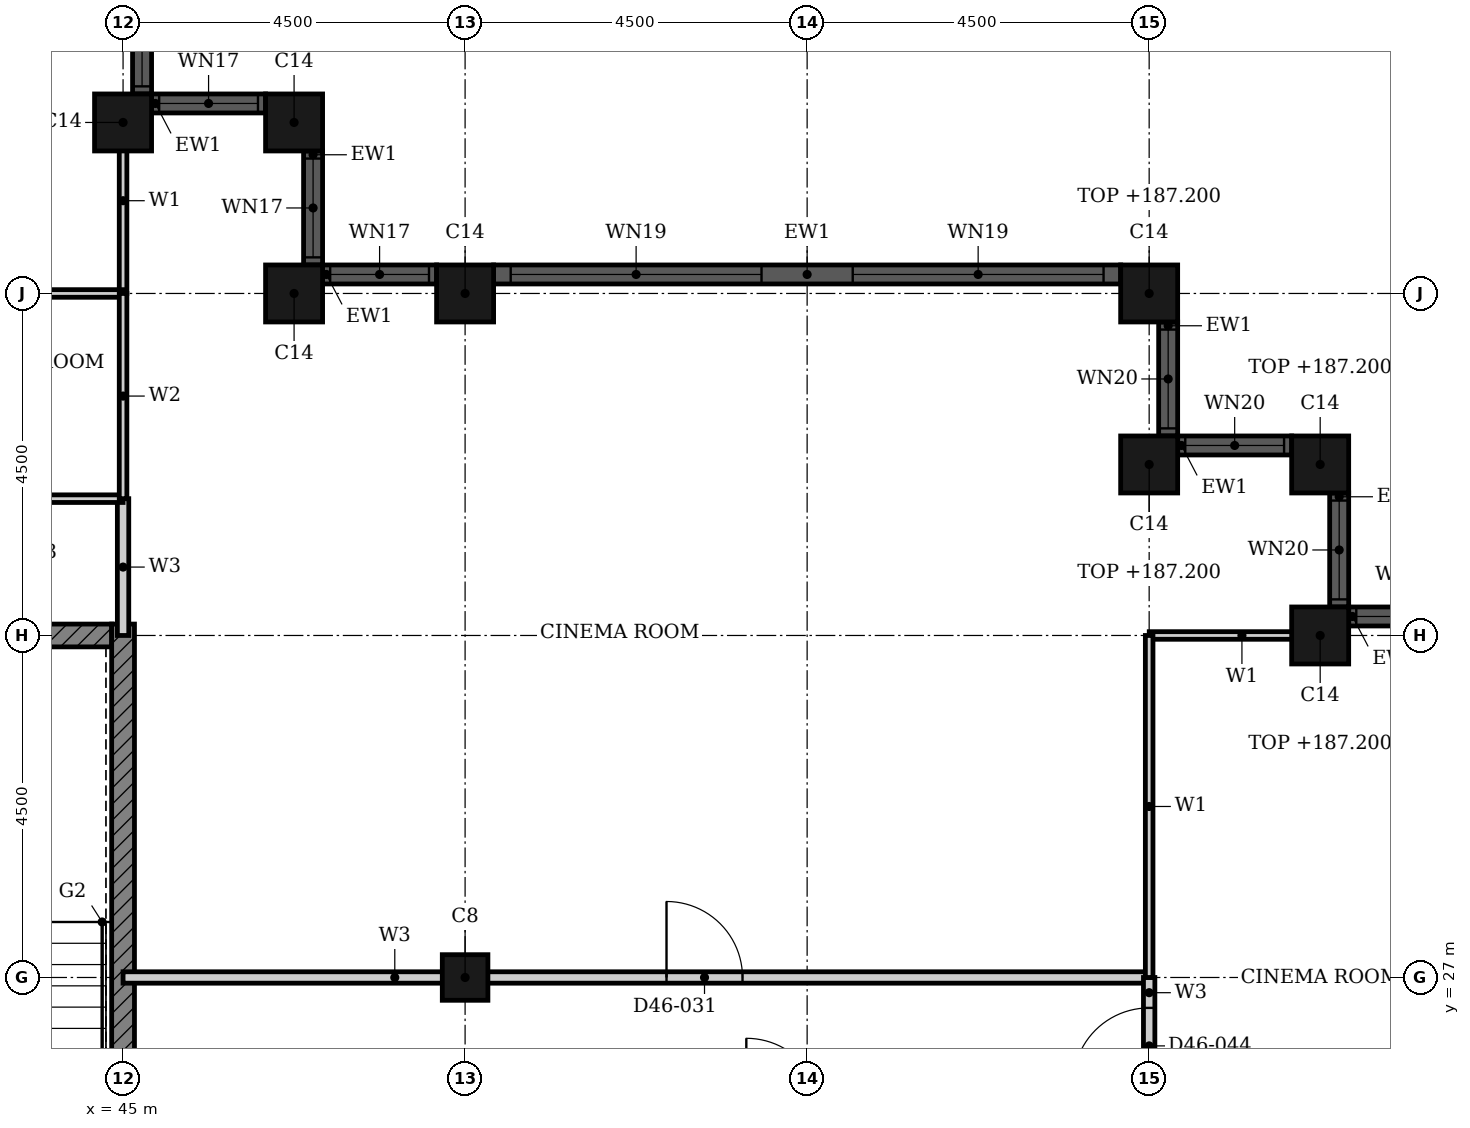
"""IFC4 building model, lengths in metres.
Left out: names, types, materials, properties, quantities, classifications, styles, units other than length and angle.
Written with IfcOpenShell. Run it as: python <this file> out.ifc"""

import sys

from ifc_helpers import new_model, si_unit, direction, frame, frame_2d, origin, origin_2d, place, context, subcontext, project, spatial, rectangle, hollow_rectangle, extrude, element, fill, save


model = new_model("IFC4")
c1 = context("Model", 3, precision=1e-05, world=origin(), true_north=direction((0.0, 1.0)))
c2 = subcontext(c1, "Body", "Model", "MODEL_VIEW")
j1 = project(units=[si_unit("LENGTHUNIT", "METRE"), si_unit("PLANEANGLEUNIT", "RADIAN")], contexts=[c1])
p1 = place(None, origin())
s1 = spatial("IfcSite", under=j1, at=p1, CompositionType="ELEMENT")
p2 = place(p1, origin())
s2 = spatial("IfcBuilding", under=s1, at=p2, CompositionType="ELEMENT")
p3 = place(p2, frame((0.0, 0.0, 183.9)))
s3 = spatial("IfcBuildingStorey", under=s2, at=p3, CompositionType="ELEMENT", Elevation=183.9)
for number, where, z_axis, x_axis in (
    (1, (60.75, 31.5, 0.0), (0.0, 0.0, 1.0), (1.0, 0.0, 0.0)),
    (2, (60.75, 33.75, 0.0), (0.0, 0.0, 1.0), (1.0, 0.0, 0.0)),
    (3, (58.5, 33.75, 0.0), (0.0, 0.0, 1.0), (1.0, 0.0, 0.0)),
    (4, (58.5, 36.0, 0.0), (0.0, 0.0, 1.0), (1.0, 0.0, 0.0)),
):
    element("IfcColumn", number, at=place(p3, frame(where, z_axis=z_axis, x_axis=x_axis)), inside=s3, PredefinedType="COLUMN", context=c2, shape_type="SweptSolid", body=[
        extrude(hollow_rectangle(XDim=0.75, YDim=0.75, WallThickness=0.024, at=origin_2d()), origin(), (0.0, 0.0, 1.0), 3.3),
    ])
for number, where, z_axis, x_axis in (
    (5, (49.5, 36.0, 0.0), (0.0, 0.0, 1.0), (1.0, 0.0, 0.0)),
    (6, (47.25, 36.0, 0.0), (0.0, 0.0, 1.0), (1.0, 0.0, 0.0)),
    (7, (47.25, 38.25, 0.0), (0.0, 0.0, 1.0), (1.0, 0.0, 0.0)),
    (8, (45.0, 38.25, 0.0), (0.0, 0.0, 1.0), (1.0, 0.0, 0.0)),
):
    element("IfcColumn", number, at=place(p3, frame(where, z_axis=z_axis, x_axis=x_axis)), inside=s3, PredefinedType="COLUMN", context=c2, shape_type="SweptSolid", body=[
        extrude(hollow_rectangle(XDim=0.75, YDim=0.75, WallThickness=0.024, at=origin_2d()), origin(), (0.0, 0.0, 1.0), 3.7),
    ])
p4 = place(p3, frame((49.5, 27.0, 0.0), z_axis=(0.0, 0.0, 1.0), x_axis=(1.0, 0.0, 0.0)))
e9 = element("IfcColumn", 9, at=p4, inside=s3, PredefinedType="COLUMN", context=c2, shape_type="SweptSolid", body=[
    extrude(hollow_rectangle(XDim=0.6, YDim=0.6, WallThickness=0.02, at=origin_2d()), origin(), (0.0, 0.0, 1.0), 3.7),
])
p5 = place(p3, frame((62.625, 31.75, 0.0), z_axis=(0.0, 0.0, 1.0), x_axis=(-1.0, 0.0, 0.0)))
e10 = element("IfcWall", 10, at=p5, inside=s3, PredefinedType="SOLIDWALL", context=c2, shape_type="SweptSolid", body=[
    extrude(rectangle(XDim=1.5, YDim=0.25, at=frame_2d((0.75, 0.0))), origin(), (0.0, 0.0, 1.0), 3.7),
])
p6 = place(p5, frame((0.1, 0.0, 0.9)))
e11 = element("IfcOpeningElement", 11, at=p6, cuts=e10, PredefinedType="OPENING", context=c2, shape_type="SweptSolid", body=[
    extrude(rectangle(XDim=1.3, YDim=1.75, at=frame_2d((0.65, 0.875))), frame((0.0, 0.135, 0.0), z_axis=(0.0, -1.0, 0.0), x_axis=(1.0, 0.0, 0.0)), (0.0, 0.0, 1.0), 0.27),
])
p7 = place(p3, frame((61.0, 31.875, 0.0), z_axis=(0.0, 0.0, 1.0), x_axis=(0.0, 1.0, 0.0)))
e12 = element("IfcWall", 12, at=p7, inside=s3, PredefinedType="SOLIDWALL", context=c2, shape_type="SweptSolid", body=[
    extrude(rectangle(XDim=1.5, YDim=0.25, at=frame_2d((0.75, 0.0))), origin(), (0.0, 0.0, 1.0), 3.7),
])
p8 = place(p7, frame((0.1, 0.0, 0.9)))
e13 = element("IfcOpeningElement", 13, at=p8, cuts=e12, PredefinedType="OPENING", context=c2, shape_type="SweptSolid", body=[
    extrude(rectangle(XDim=1.3, YDim=1.75, at=frame_2d((0.65, 0.875))), frame((0.0, 0.135, 0.0), z_axis=(0.0, -1.0, 0.0), x_axis=(1.0, 0.0, 0.0)), (0.0, 0.0, 1.0), 0.27),
])
p9 = place(p3, frame((60.375, 34.0, 0.0), z_axis=(0.0, 0.0, 1.0), x_axis=(-1.0, 0.0, 0.0)))
e14 = element("IfcWall", 14, at=p9, inside=s3, PredefinedType="SOLIDWALL", context=c2, shape_type="SweptSolid", body=[
    extrude(rectangle(XDim=1.5, YDim=0.25, at=frame_2d((0.75, 0.0))), origin(), (0.0, 0.0, 1.0), 3.7),
])
p10 = place(p9, frame((0.1, 0.0, 0.9)))
e15 = element("IfcOpeningElement", 15, at=p10, cuts=e14, PredefinedType="OPENING", context=c2, shape_type="SweptSolid", body=[
    extrude(rectangle(XDim=1.3, YDim=1.75, at=frame_2d((0.65, 0.875))), frame((0.0, 0.135, 0.0), z_axis=(0.0, -1.0, 0.0), x_axis=(1.0, 0.0, 0.0)), (0.0, 0.0, 1.0), 0.27),
])
p11 = place(p3, frame((58.75, 34.125, 0.0), z_axis=(0.0, 0.0, 1.0), x_axis=(0.0, 1.0, 0.0)))
e16 = element("IfcWall", 16, at=p11, inside=s3, PredefinedType="SOLIDWALL", context=c2, shape_type="SweptSolid", body=[
    extrude(rectangle(XDim=1.5, YDim=0.25, at=frame_2d((0.75, 0.0))), origin(), (0.0, 0.0, 1.0), 3.7),
])
p12 = place(p11, frame((0.1, 0.0, 0.9)))
e17 = element("IfcOpeningElement", 17, at=p12, cuts=e16, PredefinedType="OPENING", context=c2, shape_type="SweptSolid", body=[
    extrude(rectangle(XDim=1.3, YDim=1.75, at=frame_2d((0.65, 0.875))), frame((0.0, 0.135, 0.0), z_axis=(0.0, -1.0, 0.0), x_axis=(1.0, 0.0, 0.0)), (0.0, 0.0, 1.0), 0.27),
])
p13 = place(p3, frame((58.125, 36.25, 0.0), z_axis=(0.0, 0.0, 1.0), x_axis=(-1.0, 0.0, 0.0)))
e18 = element("IfcWall", 18, at=p13, inside=s3, PredefinedType="SOLIDWALL", context=c2, shape_type="SweptSolid", body=[
    extrude(rectangle(XDim=8.25, YDim=0.25, at=frame_2d((4.125, 0.0))), origin(), (0.0, 0.0, 1.0), 3.7),
])
p14 = place(p13, frame((0.225, 0.0, 0.45)))
e19 = element("IfcOpeningElement", 19, at=p14, cuts=e18, PredefinedType="OPENING", context=c2, shape_type="SweptSolid", body=[
    extrude(rectangle(XDim=3.3, YDim=2.2, at=frame_2d((1.65, 1.1))), frame((0.0, 0.135, 0.0), z_axis=(0.0, -1.0, 0.0), x_axis=(1.0, 0.0, 0.0)), (0.0, 0.0, 1.0), 0.27),
])
p15 = place(p13, frame((4.725, 0.0, 0.45)))
e20 = element("IfcOpeningElement", 20, at=p15, cuts=e18, PredefinedType="OPENING", context=c2, shape_type="SweptSolid", body=[
    extrude(rectangle(XDim=3.3, YDim=2.2, at=frame_2d((1.65, 1.1))), frame((0.0, 0.135, 0.0), z_axis=(0.0, -1.0, 0.0), x_axis=(1.0, 0.0, 0.0)), (0.0, 0.0, 1.0), 0.27),
])
p16 = place(p3, frame((49.125, 36.25, 0.0), z_axis=(0.0, 0.0, 1.0), x_axis=(-1.0, 0.0, 0.0)))
e21 = element("IfcWall", 21, at=p16, inside=s3, PredefinedType="SOLIDWALL", context=c2, shape_type="SweptSolid", body=[
    extrude(rectangle(XDim=1.5, YDim=0.25, at=frame_2d((0.75, 0.0))), origin(), (0.0, 0.0, 1.0), 3.7),
])
p17 = place(p16, frame((0.1, 0.0, 0.9)))
e22 = element("IfcOpeningElement", 22, at=p17, cuts=e21, PredefinedType="OPENING", context=c2, shape_type="SweptSolid", body=[
    extrude(rectangle(XDim=1.3, YDim=1.95, at=frame_2d((0.65, 0.975))), frame((0.0, 0.135, 0.0), z_axis=(0.0, -1.0, 0.0), x_axis=(1.0, 0.0, 0.0)), (0.0, 0.0, 1.0), 0.27),
])
p18 = place(p3, frame((47.5, 36.375, 0.0), z_axis=(0.0, 0.0, 1.0), x_axis=(0.0, 1.0, 0.0)))
e23 = element("IfcWall", 23, at=p18, inside=s3, PredefinedType="SOLIDWALL", context=c2, shape_type="SweptSolid", body=[
    extrude(rectangle(XDim=1.5, YDim=0.25, at=frame_2d((0.75, 0.0))), origin(), (0.0, 0.0, 1.0), 3.7),
])
p19 = place(p18, frame((0.1, 0.0, 0.9)))
e24 = element("IfcOpeningElement", 24, at=p19, cuts=e23, PredefinedType="OPENING", context=c2, shape_type="SweptSolid", body=[
    extrude(rectangle(XDim=1.3, YDim=1.95, at=frame_2d((0.65, 0.975))), frame((0.0, 0.135, 0.0), z_axis=(0.0, -1.0, 0.0), x_axis=(1.0, 0.0, 0.0)), (0.0, 0.0, 1.0), 0.27),
])
p20 = place(p3, frame((46.875, 38.5, 0.0), z_axis=(0.0, 0.0, 1.0), x_axis=(-1.0, 0.0, 0.0)))
e25 = element("IfcWall", 25, at=p20, inside=s3, PredefinedType="SOLIDWALL", context=c2, shape_type="SweptSolid", body=[
    extrude(rectangle(XDim=1.5, YDim=0.25, at=frame_2d((0.75, 0.0))), origin(), (0.0, 0.0, 1.0), 3.7),
])
p21 = place(p20, frame((0.1, 0.0, 0.9)))
e26 = element("IfcOpeningElement", 26, at=p21, cuts=e25, PredefinedType="OPENING", context=c2, shape_type="SweptSolid", body=[
    extrude(rectangle(XDim=1.3, YDim=1.95, at=frame_2d((0.65, 0.975))), frame((0.0, 0.135, 0.0), z_axis=(0.0, -1.0, 0.0), x_axis=(1.0, 0.0, 0.0)), (0.0, 0.0, 1.0), 0.27),
])
p22 = place(p3, frame((45.25, 38.625, 0.0), z_axis=(0.0, 0.0, 1.0), x_axis=(0.0, 1.0, 0.0)))
e27 = element("IfcWall", 27, at=p22, inside=s3, PredefinedType="SOLIDWALL", context=c2, shape_type="SweptSolid", body=[
    extrude(rectangle(XDim=1.5, YDim=0.25, at=frame_2d((0.75, 0.0))), origin(), (0.0, 0.0, 1.0), 3.7),
])
p23 = place(p22, frame((0.1, 0.0, 0.9)))
e28 = element("IfcOpeningElement", 28, at=p23, cuts=e27, PredefinedType="OPENING", context=c2, shape_type="SweptSolid", body=[
    extrude(rectangle(XDim=1.3, YDim=1.95, at=frame_2d((0.65, 0.975))), frame((0.0, 0.135, 0.0), z_axis=(0.0, -1.0, 0.0), x_axis=(1.0, 0.0, 0.0)), (0.0, 0.0, 1.0), 0.27),
])
p24 = place(p3, frame((40.625, 31.5, 0.0), z_axis=(0.0, 0.0, 1.0), x_axis=(1.0, 0.0, 0.0)))
e29 = element("IfcWall", 29, at=p24, inside=s3, PredefinedType="SHEAR", context=c2, shape_type="SweptSolid", body=[
    extrude(rectangle(XDim=4.225, YDim=0.3, at=frame_2d((2.113, 0.0))), origin(), (0.0, 0.0, 1.0), 3.3),
])
p25 = place(p3, frame((45.0, 22.35, 0.0), z_axis=(0.0, 0.0, 1.0), x_axis=(0.0, 1.0, 0.0)))
e30 = element("IfcWall", 30, at=p25, inside=s3, PredefinedType="SHEAR", context=c2, shape_type="SweptSolid", body=[
    extrude(rectangle(XDim=9.3, YDim=0.3, at=frame_2d((4.65, 0.0))), origin(), (0.0, 0.0, 1.0), 3.3),
])
p26 = place(p3, frame((45.0, 27.0, 0.0), z_axis=(0.0, 0.0, 1.0), x_axis=(1.0, 0.0, 0.0)))
e31 = element("IfcWall", 31, at=p26, inside=s3, PredefinedType="PARTITIONING", context=c2, shape_type="SweptSolid", body=[
    extrude(rectangle(XDim=13.5, YDim=0.15, at=frame_2d((6.75, 0.0))), origin(), (0.0, 0.0, 1.0), 2.58),
])
p27 = place(p26, frame((7.15, 0.0, 0.0)))
e32 = element("IfcOpeningElement", 32, at=p27, cuts=e31, PredefinedType="OPENING", context=c2, shape_type="SweptSolid", body=[
    extrude(rectangle(XDim=1.0, YDim=2.1, at=frame_2d((0.5, 1.05))), frame((0.0, 0.085, 0.0), z_axis=(0.0, -1.0, 0.0), x_axis=(1.0, 0.0, 0.0)), (0.0, 0.0, 1.0), 0.17),
])
p28 = place(p3, frame((45.0, 31.5, 0.0), z_axis=(0.0, 0.0, 1.0), x_axis=(0.0, 1.0, 0.0)))
e33 = element("IfcWall", 33, at=p28, inside=s3, PredefinedType="PARTITIONING", context=c2, shape_type="SweptSolid", body=[
    extrude(rectangle(XDim=1.8, YDim=0.15, at=frame_2d((0.9, 0.0))), origin(), (0.0, 0.0, 1.0), 3.3),
])
p29 = place(p3, frame((58.5, 25.2, 0.0), z_axis=(0.0, 0.0, 1.0), x_axis=(0.0, 1.0, 0.0)))
e34 = element("IfcWall", 34, at=p29, inside=s3, PredefinedType="PARTITIONING", context=c2, shape_type="SweptSolid", body=[
    extrude(rectangle(XDim=1.8, YDim=0.15, at=frame_2d((0.9, 0.0))), origin(), (0.0, 0.0, 1.0), 3.3),
])
p30 = place(p29, frame((0.4, 0.0, 0.0)))
e35 = element("IfcOpeningElement", 35, at=p30, cuts=e34, PredefinedType="OPENING", context=c2, shape_type="SweptSolid", body=[
    extrude(rectangle(XDim=1.0, YDim=2.1, at=frame_2d((0.5, 1.05))), frame((0.0, 0.085, 0.0), z_axis=(0.0, -1.0, 0.0), x_axis=(1.0, 0.0, 0.0)), (0.0, 0.0, 1.0), 0.17),
])
p31 = place(p3, frame((58.501, 31.5, 0.0), z_axis=(0.0, 0.0, 1.0), x_axis=(1.0, 0.0, 0.0)))
e36 = element("IfcWall", 36, at=p31, inside=s3, PredefinedType="PARTITIONING", context=c2, shape_type="SweptSolid", body=[
    extrude(rectangle(XDim=2.439, YDim=0.1, at=frame_2d((1.219, 0.0))), origin(), (0.0, 0.0, 1.0), 2.58),
])
p32 = place(p3, frame((45.0, 36.001, 0.0), z_axis=(0.0, 0.0, 1.0), x_axis=(0.0, 1.0, 0.0)))
e37 = element("IfcWall", 37, at=p32, inside=s3, PredefinedType="PARTITIONING", context=c2, shape_type="SweptSolid", body=[
    extrude(rectangle(XDim=2.439, YDim=0.1, at=frame_2d((1.219, 0.0))), origin(), (0.0, 0.0, 1.0), 3.3),
])
p33 = place(p3, frame((58.5, 27.0, 0.0), z_axis=(0.0, 0.0, 1.0), x_axis=(0.0, 1.0, 0.0)))
e38 = element("IfcWall", 38, at=p33, inside=s3, PredefinedType="PARTITIONING", context=c2, shape_type="SweptSolid", body=[
    extrude(rectangle(XDim=4.5, YDim=0.1, at=frame_2d((2.25, 0.0))), origin(), (0.0, 0.0, 1.0), 3.3),
])
for number, where, z_axis, x_axis in (
    (39, (42.6, 33.3, 0.0), (0.0, 0.0, 1.0), (1.0, 0.0, 0.0)),
    (40, (42.6, 36.0, 0.0), (0.0, 0.0, 1.0), (1.0, 0.0, 0.0)),
):
    element("IfcWall", number, at=place(p3, frame(where, z_axis=z_axis, x_axis=x_axis)), inside=s3, PredefinedType="PARTITIONING", context=c2, shape_type="SweptSolid", body=[
        extrude(rectangle(XDim=2.4, YDim=0.1, at=frame_2d((1.2, 0.0))), origin(), (0.0, 0.0, 1.0), 3.3),
    ])
p34 = place(p3, frame((45.0, 33.3, 0.0), z_axis=(0.0, 0.0, 1.0), x_axis=(0.0, 1.0, 0.0)))
e41 = element("IfcWall", 41, at=p34, inside=s3, PredefinedType="PARTITIONING", context=c2, shape_type="SweptSolid", body=[
    extrude(rectangle(XDim=2.7, YDim=0.1, at=frame_2d((1.35, 0.0))), origin(), (0.0, 0.0, 1.0), 3.3),
])
p35 = place(p6, origin())
e42 = element("IfcWindow", 42, at=p35, inside=s3, PartitioningType="SINGLE_PANEL", PredefinedType="WINDOW", context=c2, shape_type="SweptSolid", body=[
    extrude(rectangle(XDim=1.3, YDim=1.75, at=frame_2d((0.65, 0.875))), frame((0.0, 0.03, 0.0), z_axis=(0.0, -1.0, 0.0), x_axis=(1.0, 0.0, 0.0)), (0.0, 0.0, 1.0), 0.06),
])
fill(e11, e42)
p36 = place(p8, origin())
e43 = element("IfcWindow", 43, at=p36, inside=s3, PartitioningType="SINGLE_PANEL", PredefinedType="WINDOW", context=c2, shape_type="SweptSolid", body=[
    extrude(rectangle(XDim=1.3, YDim=1.75, at=frame_2d((0.65, 0.875))), frame((0.0, 0.03, 0.0), z_axis=(0.0, -1.0, 0.0), x_axis=(1.0, 0.0, 0.0)), (0.0, 0.0, 1.0), 0.06),
])
fill(e13, e43)
p37 = place(p10, origin())
e44 = element("IfcWindow", 44, at=p37, inside=s3, PartitioningType="SINGLE_PANEL", PredefinedType="WINDOW", context=c2, shape_type="SweptSolid", body=[
    extrude(rectangle(XDim=1.3, YDim=1.75, at=frame_2d((0.65, 0.875))), frame((0.0, 0.03, 0.0), z_axis=(0.0, -1.0, 0.0), x_axis=(1.0, 0.0, 0.0)), (0.0, 0.0, 1.0), 0.06),
])
fill(e15, e44)
p38 = place(p12, origin())
e45 = element("IfcWindow", 45, at=p38, inside=s3, PartitioningType="SINGLE_PANEL", PredefinedType="WINDOW", context=c2, shape_type="SweptSolid", body=[
    extrude(rectangle(XDim=1.3, YDim=1.75, at=frame_2d((0.65, 0.875))), frame((0.0, 0.03, 0.0), z_axis=(0.0, -1.0, 0.0), x_axis=(1.0, 0.0, 0.0)), (0.0, 0.0, 1.0), 0.06),
])
fill(e17, e45)
p39 = place(p14, origin())
e46 = element("IfcWindow", 46, at=p39, inside=s3, PartitioningType="SINGLE_PANEL", PredefinedType="WINDOW", context=c2, shape_type="SweptSolid", body=[
    extrude(rectangle(XDim=3.3, YDim=2.2, at=frame_2d((1.65, 1.1))), frame((0.0, 0.03, 0.0), z_axis=(0.0, -1.0, 0.0), x_axis=(1.0, 0.0, 0.0)), (0.0, 0.0, 1.0), 0.06),
])
fill(e19, e46)
p40 = place(p15, origin())
e47 = element("IfcWindow", 47, at=p40, inside=s3, PartitioningType="SINGLE_PANEL", PredefinedType="WINDOW", context=c2, shape_type="SweptSolid", body=[
    extrude(rectangle(XDim=3.3, YDim=2.2, at=frame_2d((1.65, 1.1))), frame((0.0, 0.03, 0.0), z_axis=(0.0, -1.0, 0.0), x_axis=(1.0, 0.0, 0.0)), (0.0, 0.0, 1.0), 0.06),
])
fill(e20, e47)
p41 = place(p17, origin())
e48 = element("IfcWindow", 48, at=p41, inside=s3, PartitioningType="SINGLE_PANEL", PredefinedType="WINDOW", context=c2, shape_type="SweptSolid", body=[
    extrude(rectangle(XDim=1.3, YDim=1.95, at=frame_2d((0.65, 0.975))), frame((0.0, 0.03, 0.0), z_axis=(0.0, -1.0, 0.0), x_axis=(1.0, 0.0, 0.0)), (0.0, 0.0, 1.0), 0.06),
])
fill(e22, e48)
p42 = place(p19, origin())
e49 = element("IfcWindow", 49, at=p42, inside=s3, PartitioningType="SINGLE_PANEL", PredefinedType="WINDOW", context=c2, shape_type="SweptSolid", body=[
    extrude(rectangle(XDim=1.3, YDim=1.95, at=frame_2d((0.65, 0.975))), frame((0.0, 0.03, 0.0), z_axis=(0.0, -1.0, 0.0), x_axis=(1.0, 0.0, 0.0)), (0.0, 0.0, 1.0), 0.06),
])
fill(e24, e49)
p43 = place(p21, origin())
e50 = element("IfcWindow", 50, at=p43, inside=s3, PartitioningType="SINGLE_PANEL", PredefinedType="WINDOW", context=c2, shape_type="SweptSolid", body=[
    extrude(rectangle(XDim=1.3, YDim=1.95, at=frame_2d((0.65, 0.975))), frame((0.0, 0.03, 0.0), z_axis=(0.0, -1.0, 0.0), x_axis=(1.0, 0.0, 0.0)), (0.0, 0.0, 1.0), 0.06),
])
fill(e26, e50)
p44 = place(p23, origin())
e51 = element("IfcWindow", 51, at=p44, inside=s3, PartitioningType="SINGLE_PANEL", PredefinedType="WINDOW", context=c2, shape_type="SweptSolid", body=[
    extrude(rectangle(XDim=1.3, YDim=1.95, at=frame_2d((0.65, 0.975))), frame((0.0, 0.03, 0.0), z_axis=(0.0, -1.0, 0.0), x_axis=(1.0, 0.0, 0.0)), (0.0, 0.0, 1.0), 0.06),
])
fill(e28, e51)
p45 = place(p27, origin())
e52 = element("IfcDoor", 52, at=p45, inside=s3, OperationType="SINGLE_SWING_RIGHT", PredefinedType="DOOR", context=c2, shape_type="SweptSolid", body=[
    extrude(rectangle(XDim=1.0, YDim=2.1, at=frame_2d((0.5, 1.05))), frame((0.0, 0.025, 0.0), z_axis=(0.0, -1.0, 0.0), x_axis=(1.0, 0.0, 0.0)), (0.0, 0.0, 1.0), 0.05),
])
fill(e32, e52)
p46 = place(p30, origin())
e53 = element("IfcDoor", 53, at=p46, inside=s3, OperationType="SINGLE_SWING_LEFT", PredefinedType="DOOR", context=c2, shape_type="SweptSolid", body=[
    extrude(rectangle(XDim=1.0, YDim=2.1, at=frame_2d((0.5, 1.05))), frame((0.0, 0.025, 0.0), z_axis=(0.0, -1.0, 0.0), x_axis=(1.0, 0.0, 0.0)), (0.0, 0.0, 1.0), 0.05),
])
fill(e35, e53)
save(model, sys.argv[1])
